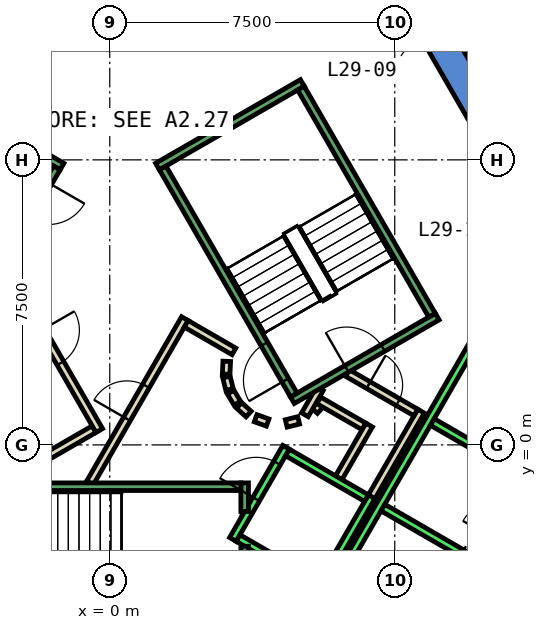
"""IFC4 building model, lengths in metres.
Left out: names, types, materials, properties, quantities, classifications, styles, units other than length and angle.
Written with IfcOpenShell. Run it as: python <this file> out.ifc"""

import sys

from ifc_helpers import new_model, si_unit, direction, frame, frame_2d, origin, place, context, subcontext, project, spatial, polyline, rectangle, outline, extrude, element, fill, save


model = new_model("IFC4")
c1 = context("Model", 3, precision=1e-05, world=origin(), true_north=direction((0.0, 1.0)))
c2 = subcontext(c1, "Body", "Model", "MODEL_VIEW")
j1 = project(units=[si_unit("LENGTHUNIT", "METRE"), si_unit("PLANEANGLEUNIT", "RADIAN")], contexts=[c1])
p1 = place(None, origin())
s1 = spatial("IfcSite", under=j1, at=p1, CompositionType="ELEMENT")
p2 = place(p1, origin())
s2 = spatial("IfcBuilding", under=s1, at=p2, CompositionType="ELEMENT")
p3 = place(p2, frame((0.0, 0.0, 132.8)))
s3 = spatial("IfcBuildingStorey", under=s2, at=p3, CompositionType="ELEMENT", Elevation=132.8)
p4 = place(p3, frame((0.0, 0.0, -0.6)))
e1 = element("IfcWall", 1, at=p4, inside=s3, PredefinedType="SHEAR", context=c2, shape_type="SweptSolid", body=[
    extrude(outline(polyline([(8.517, 11.747), (7.824, 11.347), (12.933, 2.5), (13.856, 2.5), (8.517, 11.747)])), origin(), (0.0, 0.0, 1.0), 5.4),
])
p5 = place(p3, frame((0.0, 0.0, -0.6)))
e2 = element("IfcWall", 2, at=p5, inside=s3, PredefinedType="SHEAR", context=c2, shape_type="SweptSolid", body=[
    extrude(outline(polyline([(10.717, -2.937), (10.025, -2.537), (9.374, -3.663), (10.067, -4.063), (10.717, -2.937)])), origin(), (0.0, 0.0, 1.0), 5.4),
])
p6 = place(p3, frame((5.39, 0.898, 0.0), z_axis=(0.0, 0.0, 1.0), x_axis=(0.673828488714, 0.738887791073, 0.0)))
e3 = element("IfcWall", 3, at=p6, inside=s3, PredefinedType="PARTITIONING", context=c2, shape_type="SweptSolid", body=[
    extrude(rectangle(XDim=0.263, YDim=0.2, at=frame_2d((0.131, 0.0))), origin(), (0.0, 0.0, 1.0), 4.8),
])
p7 = place(p3, frame((5.499, 1.172, 0.0), z_axis=(0.0, 0.0, 1.0), x_axis=(0.866333505267, -0.499465972466, 0.0)))
e4 = element("IfcWall", 4, at=p7, inside=s3, PredefinedType="PARTITIONING", context=c2, shape_type="SweptSolid", body=[
    extrude(rectangle(XDim=1.374, YDim=0.2, at=frame_2d((0.687, 0.0))), origin(), (0.0, 0.0, 1.0), 4.8),
])
p8 = place(p3, frame((6.826, 0.522, 0.0), z_axis=(0.0, 0.0, 1.0), x_axis=(-0.500016722714, -0.866015748706, 0.0)))
e5 = element("IfcWall", 5, at=p8, inside=s3, PredefinedType="PARTITIONING", context=c2, shape_type="SweptSolid", body=[
    extrude(rectangle(XDim=1.7, YDim=0.2, at=frame_2d((0.85, 0.0))), origin(), (0.0, 0.0, 1.0), 4.8),
])
p9 = place(p3, frame((8.192, 0.888, 0.0), z_axis=(0.0, 0.0, 1.0), x_axis=(-0.499940625693, -0.866059680843, 0.0)))
e6 = element("IfcWall", 6, at=p9, inside=s3, PredefinedType="PARTITIONING", context=c2, shape_type="SweptSolid", body=[
    extrude(rectangle(XDim=2.68, YDim=0.2, at=frame_2d((1.34, 0.0))), origin(), (0.0, 0.0, 1.0), 4.8),
])
p10 = place(p3, frame((5.135, 0.793, 0.0), z_axis=(0.0, 0.0, 1.0), x_axis=(0.499526442893, 0.866298639529, 0.0)))
e7 = element("IfcWall", 7, at=p10, inside=s3, PredefinedType="PARTITIONING", context=c2, shape_type="SweptSolid", body=[
    extrude(rectangle(XDim=0.791, YDim=0.2, at=frame_2d((0.396, 0.0))), origin(), (0.0, 0.0, 1.0), 4.8),
])
p11 = place(p3, frame((6.25, 1.894, 0.0), z_axis=(0.0, 0.0, 1.0), x_axis=(0.866043184279, -0.499969202016, 0.0)))
e8 = element("IfcWall", 8, at=p11, inside=s3, PredefinedType="PARTITIONING", context=c2, shape_type="SweptSolid", body=[
    extrude(rectangle(XDim=2.084, YDim=0.2, at=frame_2d((1.042, 0.0))), origin(), (0.0, 0.0, 1.0), 4.8),
])
p12 = place(p11, frame((0.642, 0.0, 0.0)))
e9 = element("IfcOpeningElement", 9, at=p12, cuts=e8, PredefinedType="OPENING", context=c2, shape_type="SweptSolid", body=[
    extrude(rectangle(XDim=0.9, YDim=2.1, at=frame_2d((0.45, 1.05))), frame((0.0, 0.11, 0.0), z_axis=(0.0, -1.0, 0.0), x_axis=(1.0, 0.0, 0.0)), (0.0, 0.0, 1.0), 0.22),
])
p13 = place(p3, frame((3.079, 2.199, 0.0), z_axis=(0.0, 0.0, 1.0), x_axis=(-0.047771483479, -0.998858290933, 0.0)))
e10 = element("IfcWall", 10, at=p13, inside=s3, PredefinedType="PARTITIONING", context=c2, shape_type="SweptSolid", body=[
    extrude(rectangle(XDim=0.337, YDim=0.2, at=frame_2d((0.169, 0.0))), origin(), (0.0, 0.0, 1.0), 4.8),
])
p14 = place(p3, frame((3.07, 1.786, 0.0), z_axis=(0.0, 0.0, 1.0), x_axis=(0.242705583207, -0.970099994784, 0.0)))
e11 = element("IfcWall", 11, at=p14, inside=s3, PredefinedType="PARTITIONING", context=c2, shape_type="SweptSolid", body=[
    extrude(rectangle(XDim=0.338, YDim=0.2, at=frame_2d((0.169, 0.0))), origin(), (0.0, 0.0, 1.0), 4.8),
])
for number, where, z_axis, x_axis in (
    (12, (3.182, 1.388, 0.0), (0.0, 0.0, 1.0), (0.512, -0.859, 0.0)),
    (13, (3.404, 1.039, 0.0), (0.0, 0.0, 1.0), (0.74, -0.672, 0.0)),
):
    element("IfcWall", number, at=place(p3, frame(where, z_axis=z_axis, x_axis=x_axis)), inside=s3, PredefinedType="PARTITIONING", context=c2, shape_type="SweptSolid", body=[
        extrude(rectangle(XDim=0.338, YDim=0.2, at=frame_2d((0.169, 0.0))), origin(), (0.0, 0.0, 1.0), 4.8),
    ])
p15 = place(p3, frame((3.838, 0.702, 0.0), z_axis=(0.0, 0.0, 1.0), x_axis=(0.941035081519, -0.338308993895, 0.0)))
e14 = element("IfcWall", 14, at=p15, inside=s3, PredefinedType="PARTITIONING", context=c2, shape_type="SweptSolid", body=[
    extrude(rectangle(XDim=0.337, YDim=0.2, at=frame_2d((0.168, 0.0))), origin(), (0.0, 0.0, 1.0), 4.8),
])
p16 = place(p3, frame((4.644, 0.564, 0.0), z_axis=(0.0, 0.0, 1.0), x_axis=(0.969929076366, 0.243387729394, 0.0)))
e15 = element("IfcWall", 15, at=p16, inside=s3, PredefinedType="PARTITIONING", context=c2, shape_type="SweptSolid", body=[
    extrude(rectangle(XDim=0.337, YDim=0.2, at=frame_2d((0.168, 0.0))), origin(), (0.0, 0.0, 1.0), 4.8),
])
p17 = place(p3, frame((-0.52, -1.0, 0.0), z_axis=(0.0, 0.0, 1.0), x_axis=(0.50011622646, 0.865958290007, 0.0)))
e16 = element("IfcWall", 16, at=p17, inside=s3, PredefinedType="PARTITIONING", context=c2, shape_type="SweptSolid", body=[
    extrude(rectangle(XDim=4.991, YDim=0.2, at=frame_2d((2.496, 0.0))), origin(), (0.0, 0.0, 1.0), 4.8),
])
p18 = place(p17, frame((1.945, 0.0, 0.0)))
e17 = element("IfcOpeningElement", 17, at=p18, cuts=e16, PredefinedType="OPENING", context=c2, shape_type="SweptSolid", body=[
    extrude(rectangle(XDim=1.0, YDim=2.1, at=frame_2d((0.5, 1.05))), frame((0.0, 0.11, 0.0), z_axis=(0.0, -1.0, 0.0), x_axis=(1.0, 0.0, 0.0)), (0.0, 0.0, 1.0), 0.22),
])
p19 = place(p3, frame((2.012, 3.186, 0.0), z_axis=(0.0, 0.0, 1.0), x_axis=(0.865891012941, -0.500232699559, 0.0)))
e18 = element("IfcWall", 18, at=p19, inside=s3, PredefinedType="PARTITIONING", context=c2, shape_type="SweptSolid", body=[
    extrude(rectangle(XDim=1.449, YDim=0.2, at=frame_2d((0.725, 0.0))), origin(), (0.0, 0.0, 1.0), 4.8),
])
p20 = place(p3, frame((-0.412, 0.414, 0.0), z_axis=(0.0, 0.0, 1.0), x_axis=(-0.866017369001, -0.500013916395, 0.0)))
e19 = element("IfcWall", 19, at=p20, inside=s3, PredefinedType="PARTITIONING", context=c2, shape_type="SweptSolid", body=[
    extrude(rectangle(XDim=1.45, YDim=0.2, at=frame_2d((0.725, 0.0))), origin(), (0.0, 0.0, 1.0), 4.8),
])
p21 = place(p3, frame((-2.771, 4.7, 0.0), z_axis=(0.0, 0.0, 1.0), x_axis=(0.499969479948, -0.866043023828, 0.0)))
e20 = element("IfcWall", 20, at=p21, inside=s3, PredefinedType="PARTITIONING", context=c2, shape_type="SweptSolid", body=[
    extrude(rectangle(XDim=4.99, YDim=0.2, at=frame_2d((2.495, 0.0))), origin(), (0.0, 0.0, 1.0), 4.8),
])
p22 = place(p21, frame((1.945, 0.0, 0.0)))
e21 = element("IfcOpeningElement", 21, at=p22, cuts=e20, PredefinedType="OPENING", context=c2, shape_type="SweptSolid", body=[
    extrude(rectangle(XDim=1.0, YDim=2.1, at=frame_2d((0.5, 1.05))), frame((0.0, 0.11, 0.0), z_axis=(0.0, -1.0, 0.0), x_axis=(1.0, 0.0, 0.0)), (0.0, 0.0, 1.0), 0.22),
])
p23 = place(p3, frame((3.24, -2.488, 0.0), z_axis=(0.0, 0.0, 1.0), x_axis=(0.49994636267, 0.866056369097, 0.0)))
e22 = element("IfcWall", 22, at=p23, inside=s3, PredefinedType="STANDARD", context=c2, shape_type="SweptSolid", body=[
    extrude(rectangle(XDim=2.8, YDim=0.2, at=frame_2d((1.4, 0.0))), origin(), (0.0, 0.0, 1.0), 4.8),
])
p24 = place(p23, frame((1.225, 0.0, 0.0)))
e23 = element("IfcOpeningElement", 23, at=p24, cuts=e22, PredefinedType="OPENING", context=c2, shape_type="SweptSolid", body=[
    extrude(rectangle(XDim=1.1, YDim=2.1, at=frame_2d((0.55, 1.05))), frame((0.0, 0.11, 0.0), z_axis=(0.0, -1.0, 0.0), x_axis=(1.0, 0.0, 0.0)), (0.0, 0.0, 1.0), 0.22),
])
p25 = place(p3, frame((5.492, -3.788, 0.0), z_axis=(0.0, 0.0, 1.0), x_axis=(0.500011755427, 0.866018616679, 0.0)))
e24 = element("IfcWall", 24, at=p25, inside=s3, PredefinedType="STANDARD", context=c2, shape_type="SweptSolid", body=[
    extrude(rectangle(XDim=2.8, YDim=0.2, at=frame_2d((1.4, 0.0))), origin(), (0.0, 0.0, 1.0), 4.8),
])
p26 = place(p3, frame((3.377, -2.452, 0.0), z_axis=(0.0, 0.0, 1.0), x_axis=(0.865955154139, -0.50012165622, 0.0)))
e25 = element("IfcWall", 25, at=p26, inside=s3, PredefinedType="STANDARD", context=c2, shape_type="SweptSolid", body=[
    extrude(rectangle(XDim=2.4, YDim=0.2, at=frame_2d((1.2, 0.0))), origin(), (0.0, 0.0, 1.0), 4.8),
])
p27 = place(p3, frame((4.677, -0.2, 0.0), z_axis=(0.0, 0.0, 1.0), x_axis=(0.865973769406, -0.500089422704, 0.0)))
e26 = element("IfcWall", 26, at=p27, inside=s3, PredefinedType="STANDARD", context=c2, shape_type="SweptSolid", body=[
    extrude(rectangle(XDim=2.399, YDim=0.2, at=frame_2d((1.2, 0.0))), origin(), (0.0, 0.0, 1.0), 4.8),
])
p28 = place(p3, frame((4.451, -6.19, 0.0), z_axis=(0.0, 0.0, 1.0), x_axis=(0.50000090737, 0.866024879913, 0.0)))
e27 = element("IfcWall", 27, at=p28, inside=s3, PredefinedType="STANDARD", context=c2, shape_type="SweptSolid", body=[
    extrude(rectangle(XDim=10.6, YDim=0.2, at=frame_2d((5.3, 0.0))), origin(), (0.0, 0.0, 1.0), 4.8),
])
for number, where, z_axis, x_axis in (
    (28, (7.188, -1.65, 0.0), (0.0, 0.0, 1.0), (0.866, -0.5, 0.0)),
    (29, (8.488, 0.602, 0.0), (0.0, 0.0, 1.0), (0.866, -0.5, 0.0)),
):
    element("IfcWall", number, at=place(p3, frame(where, z_axis=z_axis, x_axis=x_axis)), inside=s3, PredefinedType="STANDARD", context=c2, shape_type="SweptSolid", body=[
        extrude(rectangle(XDim=2.5, YDim=0.2, at=frame_2d((1.25, 0.0))), origin(), (0.0, 0.0, 1.0), 4.8),
    ])
p29 = place(p3, frame((3.55, -2.667, 0.0), z_axis=(0.0, 0.0, 1.0), x_axis=(0.0, -1.0, 0.0)))
e30 = element("IfcWall", 30, at=p29, inside=s3, PredefinedType="STANDARD", context=c2, shape_type="SweptSolid", body=[
    extrude(rectangle(XDim=2.733, YDim=0.2, at=frame_2d((1.366, 0.0))), origin(), (0.0, 0.0, 1.0), 4.8),
])
p30 = place(p3, frame((3.55, -1.0, 0.0), z_axis=(0.0, 0.0, 1.0), x_axis=(0.0, -1.0, 0.0)))
e31 = element("IfcWall", 31, at=p30, inside=s3, PredefinedType="STANDARD", context=c2, shape_type="SweptSolid", body=[
    extrude(rectangle(XDim=0.751, YDim=0.2, at=frame_2d((0.375, 0.0))), origin(), (0.0, 0.0, 1.0), 4.8),
])
p31 = place(p3, frame((-3.45, -1.1, 0.0), z_axis=(0.0, 0.0, 1.0), x_axis=(1.0, 0.0, 0.0)))
e32 = element("IfcWall", 32, at=p31, inside=s3, PredefinedType="STANDARD", context=c2, shape_type="SweptSolid", body=[
    extrude(rectangle(XDim=6.9, YDim=0.2, at=frame_2d((3.45, 0.0))), origin(), (0.0, 0.0, 1.0), 4.8),
])
p32 = place(p31, frame((0.45, 0.0, 0.0)))
e33 = element("IfcOpeningElement", 33, at=p32, cuts=e32, PredefinedType="OPENING", context=c2, shape_type="SweptSolid", body=[
    extrude(rectangle(XDim=1.1, YDim=2.2, at=frame_2d((0.55, 1.1))), frame((0.0, 0.11, 0.0), z_axis=(0.0, -1.0, 0.0), x_axis=(1.0, 0.0, 0.0)), (0.0, 0.0, 1.0), 0.22),
])
p33 = place(p3, frame((4.806, 1.176, 0.0), z_axis=(0.0, 0.0, 1.0), x_axis=(0.866059941101, 0.499940174841, 0.0)))
e34 = element("IfcWall", 34, at=p33, inside=s3, PredefinedType="STANDARD", context=c2, shape_type="SweptSolid", body=[
    extrude(rectangle(XDim=4.4, YDim=0.2, at=frame_2d((2.2, 0.0))), origin(), (0.0, 0.0, 1.0), 4.8),
])
p34 = place(p33, frame((1.65, 0.0, 0.0)))
e35 = element("IfcOpeningElement", 35, at=p34, cuts=e34, PredefinedType="OPENING", context=c2, shape_type="SweptSolid", body=[
    extrude(rectangle(XDim=1.1, YDim=2.2, at=frame_2d((0.55, 1.1))), frame((0.0, 0.11, 0.0), z_axis=(0.0, -1.0, 0.0), x_axis=(1.0, 0.0, 0.0)), (0.0, 0.0, 1.0), 0.22),
])
p35 = place(p3, frame((1.256, 7.324, 0.0), z_axis=(0.0, 0.0, 1.0), x_axis=(0.866046073146, 0.499964197906, 0.0)))
e36 = element("IfcWall", 36, at=p35, inside=s3, PredefinedType="STANDARD", context=c2, shape_type="SweptSolid", body=[
    extrude(rectangle(XDim=4.4, YDim=0.2, at=frame_2d((2.2, 0.0))), origin(), (0.0, 0.0, 1.0), 4.8),
])
p36 = place(p3, frame((4.843, 1.312, 0.0), z_axis=(0.0, 0.0, 1.0), x_axis=(-0.499963383562, 0.866046543262, 0.0)))
e37 = element("IfcWall", 37, at=p36, inside=s3, PredefinedType="STANDARD", context=c2, shape_type="SweptSolid", body=[
    extrude(rectangle(XDim=6.9, YDim=0.2, at=frame_2d((3.45, 0.0))), origin(), (0.0, 0.0, 1.0), 4.8),
])
p37 = place(p36, frame((0.45, 0.0, 0.0)))
e38 = element("IfcOpeningElement", 38, at=p37, cuts=e37, PredefinedType="OPENING", context=c2, shape_type="SweptSolid", body=[
    extrude(rectangle(XDim=1.1, YDim=2.2, at=frame_2d((0.55, 1.1))), frame((0.0, 0.11, 0.0), z_axis=(0.0, -1.0, 0.0), x_axis=(1.0, 0.0, 0.0)), (0.0, 0.0, 1.0), 0.22),
])
p38 = place(p3, frame((8.48, 3.412, 0.0), z_axis=(0.0, 0.0, 1.0), x_axis=(-0.499978703459, 0.866037698999, 0.0)))
e39 = element("IfcWall", 39, at=p38, inside=s3, PredefinedType="STANDARD", context=c2, shape_type="SweptSolid", body=[
    extrude(rectangle(XDim=6.9, YDim=0.2, at=frame_2d((3.45, 0.0))), origin(), (0.0, 0.0, 1.0), 4.8),
])
p39 = place(p3, frame((-1.256, 7.324, 0.0), z_axis=(0.0, 0.0, 1.0), x_axis=(-0.866046073146, 0.499964197906, 0.0)))
e40 = element("IfcWall", 40, at=p39, inside=s3, PredefinedType="STANDARD", context=c2, shape_type="SweptSolid", body=[
    extrude(rectangle(XDim=4.4, YDim=0.2, at=frame_2d((2.2, 0.0))), origin(), (0.0, 0.0, 1.0), 4.8),
])
p40 = place(p39, frame((1.65, 0.0, 0.0)))
e41 = element("IfcOpeningElement", 41, at=p40, cuts=e40, PredefinedType="OPENING", context=c2, shape_type="SweptSolid", body=[
    extrude(rectangle(XDim=1.1, YDim=2.2, at=frame_2d((0.55, 1.1))), frame((0.0, 0.11, 0.0), z_axis=(0.0, -1.0, 0.0), x_axis=(1.0, 0.0, 0.0)), (0.0, 0.0, 1.0), 0.22),
])
p41 = place(p3, frame((-1.393, 7.288, 0.0), z_axis=(0.0, 0.0, 1.0), x_axis=(-0.499963383562, -0.866046543262, 0.0)))
e42 = element("IfcWall", 42, at=p41, inside=s3, PredefinedType="STANDARD", context=c2, shape_type="SweptSolid", body=[
    extrude(rectangle(XDim=6.9, YDim=0.2, at=frame_2d((3.45, 0.0))), origin(), (0.0, 0.0, 1.0), 4.8),
])
p42 = place(p41, frame((0.45, 0.0, 0.0)))
e43 = element("IfcOpeningElement", 43, at=p42, cuts=e42, PredefinedType="OPENING", context=c2, shape_type="SweptSolid", body=[
    extrude(rectangle(XDim=1.1, YDim=2.2, at=frame_2d((0.55, 1.1))), frame((0.0, 0.11, 0.0), z_axis=(0.0, -1.0, 0.0), x_axis=(1.0, 0.0, 0.0)), (0.0, 0.0, 1.0), 0.22),
])
p43 = place(p18, origin())
e44 = element("IfcDoor", 44, at=p43, inside=s3, OperationType="SINGLE_SWING_LEFT", PredefinedType="DOOR", context=c2, shape_type="SweptSolid", body=[
    extrude(rectangle(XDim=1.0, YDim=2.1, at=frame_2d((0.5, 1.05))), frame((0.0, 0.025, 0.0), z_axis=(0.0, -1.0, 0.0), x_axis=(1.0, 0.0, 0.0)), (0.0, 0.0, 1.0), 0.05),
])
fill(e17, e44)
p44 = place(p22, origin())
e45 = element("IfcDoor", 45, at=p44, inside=s3, OperationType="SINGLE_SWING_RIGHT", PredefinedType="DOOR", context=c2, shape_type="SweptSolid", body=[
    extrude(rectangle(XDim=1.0, YDim=2.1, at=frame_2d((0.5, 1.05))), frame((0.0, 0.025, 0.0), z_axis=(0.0, -1.0, 0.0), x_axis=(1.0, 0.0, 0.0)), (0.0, 0.0, 1.0), 0.05),
])
fill(e21, e45)
p45 = place(p12, origin())
e46 = element("IfcDoor", 46, at=p45, inside=s3, OperationType="SINGLE_SWING_LEFT", PredefinedType="DOOR", context=c2, shape_type="SweptSolid", body=[
    extrude(rectangle(XDim=0.9, YDim=2.1, at=frame_2d((0.45, 1.05))), frame((0.0, 0.025, 0.0), z_axis=(0.0, -1.0, 0.0), x_axis=(1.0, 0.0, 0.0)), (0.0, 0.0, 1.0), 0.05),
])
fill(e9, e46)
p46 = place(p24, origin())
e47 = element("IfcDoor", 47, at=p46, inside=s3, OperationType="SLIDING_TO_LEFT", PredefinedType="DOOR", context=c2, shape_type="SweptSolid", body=[
    extrude(rectangle(XDim=1.1, YDim=2.1, at=frame_2d((0.55, 1.05))), frame((0.0, 0.025, 0.0), z_axis=(0.0, -1.0, 0.0), x_axis=(1.0, 0.0, 0.0)), (0.0, 0.0, 1.0), 0.05),
])
fill(e23, e47)
p47 = place(p37, origin())
e48 = element("IfcDoor", 48, at=p47, inside=s3, OperationType="SINGLE_SWING_LEFT", PredefinedType="DOOR", context=c2, shape_type="SweptSolid", body=[
    extrude(rectangle(XDim=1.1, YDim=2.2, at=frame_2d((0.55, 1.1))), frame((0.0, 0.025, 0.0), z_axis=(0.0, -1.0, 0.0), x_axis=(1.0, 0.0, 0.0)), (0.0, 0.0, 1.0), 0.05),
])
fill(e38, e48)
p48 = place(p34, origin())
e49 = element("IfcDoor", 49, at=p48, inside=s3, OperationType="SINGLE_SWING_LEFT", PredefinedType="DOOR", context=c2, shape_type="SweptSolid", body=[
    extrude(rectangle(XDim=1.1, YDim=2.2, at=frame_2d((0.55, 1.1))), frame((0.0, 0.025, 0.0), z_axis=(0.0, -1.0, 0.0), x_axis=(1.0, 0.0, 0.0)), (0.0, 0.0, 1.0), 0.05),
])
fill(e35, e49)
save(model, sys.argv[1])
